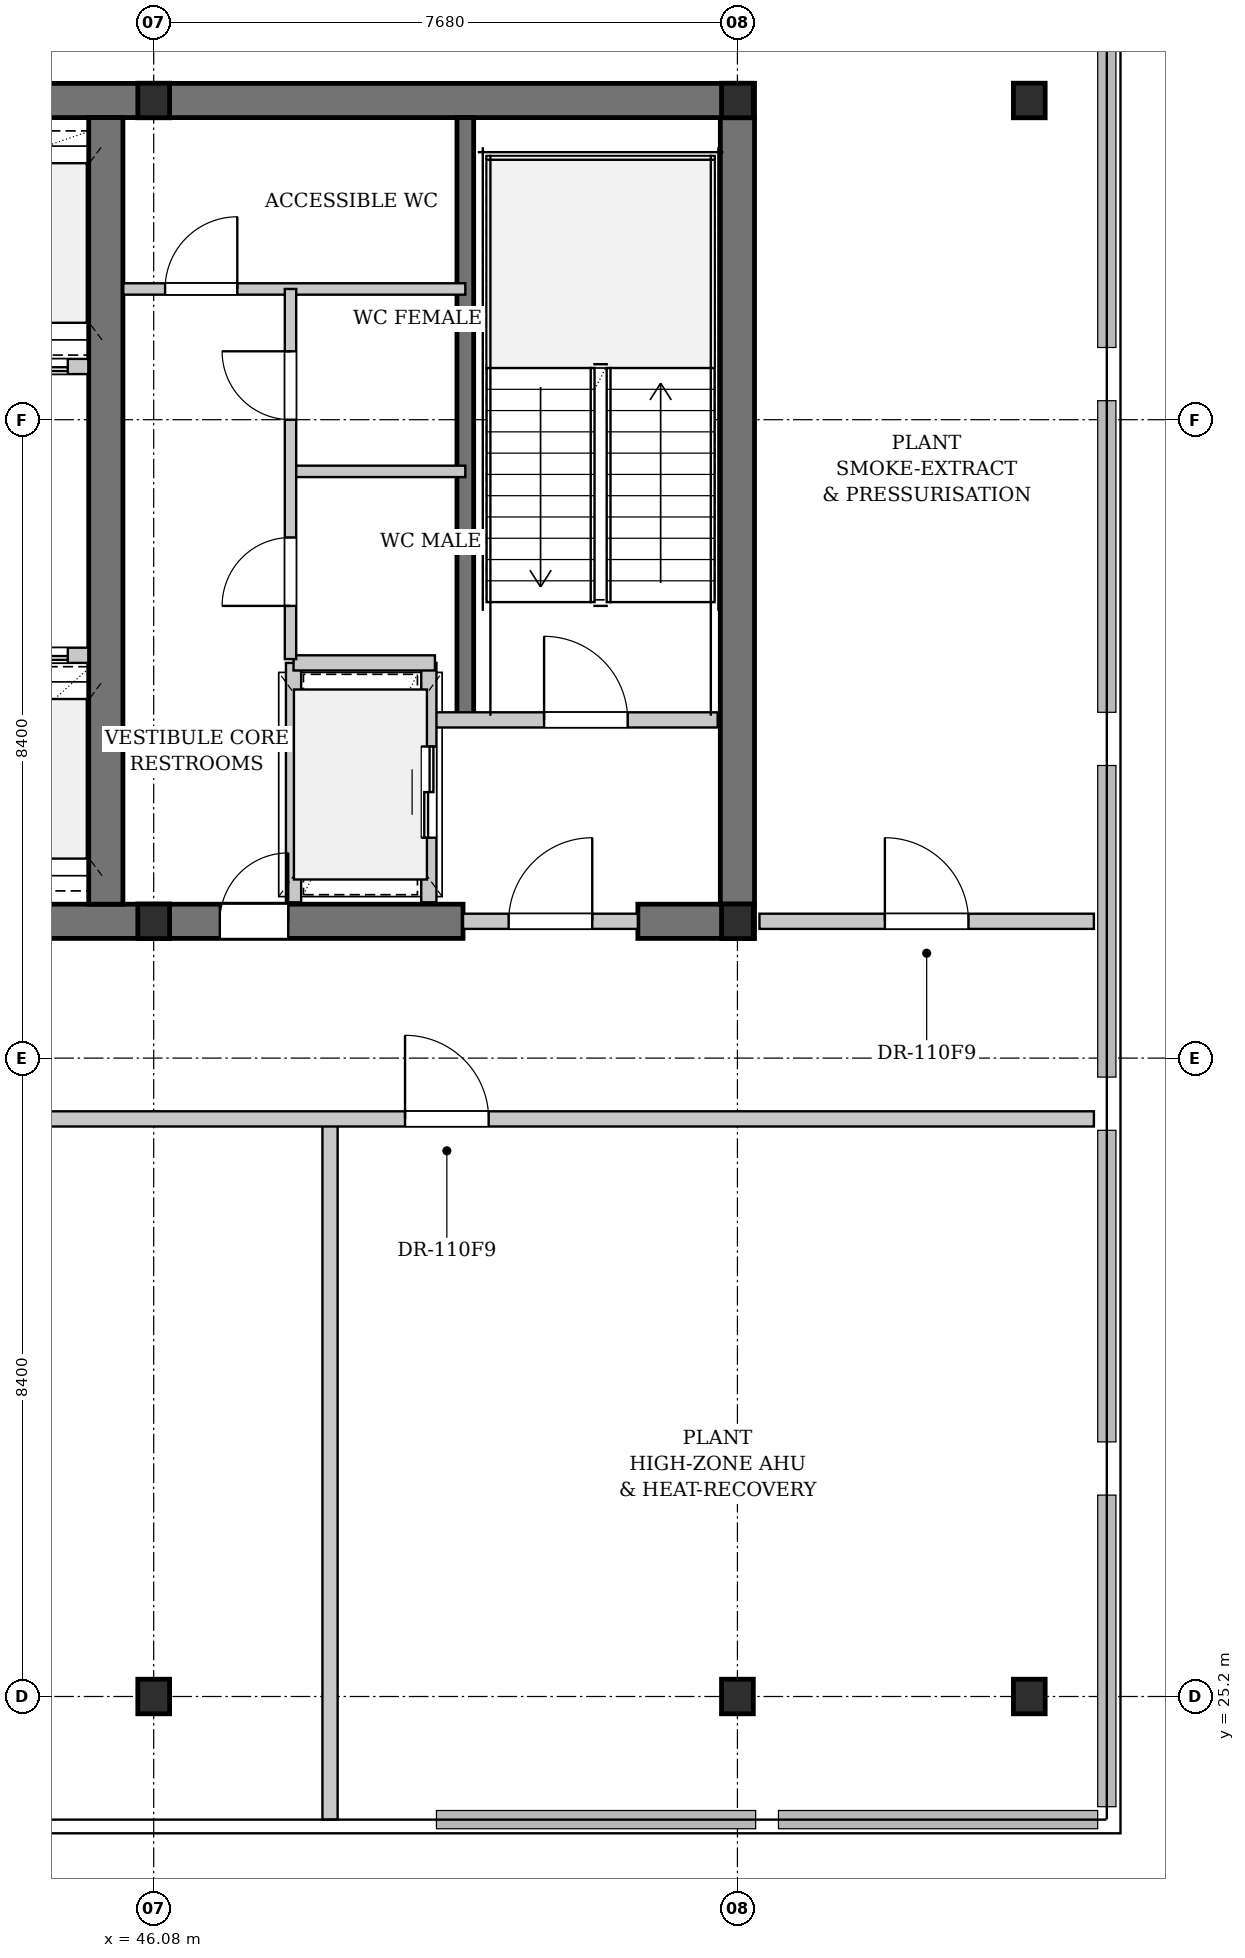
"""IFC4 building model, lengths in metres.
Left out: names, types, materials, properties, quantities, classifications, styles, units other than length and angle.
Written with IfcOpenShell. Run it as: python <this file> out.ifc"""

import sys

from ifc_helpers import new_model, si_unit, direction, frame, frame_2d, origin, origin_2d, place, context, subcontext, project, spatial, rectangle, i_section, extrude, element, fill, save


model = new_model("IFC4")
c1 = context("Model", 3, precision=1e-05, world=origin(), true_north=direction((0.0, 1.0)))
c2 = subcontext(c1, "Body", "Model", "MODEL_VIEW")
j1 = project(units=[si_unit("LENGTHUNIT", "METRE"), si_unit("PLANEANGLEUNIT", "RADIAN")], contexts=[c1])
p1 = place(None, origin())
s1 = spatial("IfcSite", under=j1, at=p1, CompositionType="ELEMENT")
p2 = place(p1, origin())
s2 = spatial("IfcBuilding", under=s1, at=p2, CompositionType="ELEMENT")
p3 = place(p2, frame((0.0, 0.0, 200.3)))
s3 = spatial("IfcBuildingStorey", under=s2, at=p3, CompositionType="ELEMENT", Elevation=200.3)
p4 = place(p3, frame((22.815, 46.2, 0.0), z_axis=(0.0, 0.0, 1.0), x_axis=(1.0, 0.0, 0.0)))
e1 = element("IfcWall", 1, at=p4, inside=s3, PredefinedType="SHEAR", context=c2, shape_type="SweptSolid", body=[
    extrude(rectangle(XDim=31.17, YDim=0.45, at=frame_2d((15.585, 0.0))), origin(), (0.0, 0.0, 1.0), 3.78),
])
p5 = place(p3, frame((42.1, 35.4, 0.0), z_axis=(0.0, 0.0, 1.0), x_axis=(1.0, 0.0, 0.0)))
e2 = element("IfcWall", 2, at=p5, inside=s3, PredefinedType="SHEAR", context=c2, shape_type="SweptSolid", body=[
    extrude(rectangle(XDim=8.05, YDim=0.45, at=frame_2d((4.025, 0.0))), origin(), (0.0, 0.0, 1.0), 3.78),
])
p6 = place(p5, frame((4.85, 0.0, 0.0)))
e3 = element("IfcOpeningElement", 3, at=p6, cuts=e2, PredefinedType="OPENING", context=c2, shape_type="SweptSolid", body=[
    extrude(rectangle(XDim=0.9, YDim=2.15, at=frame_2d((0.45, 1.075))), frame((0.0, 0.235, 0.0), z_axis=(0.0, -1.0, 0.0), x_axis=(1.0, 0.0, 0.0)), (0.0, 0.0, 1.0), 0.47),
])
p7 = place(p3, frame((52.45, 35.4, 0.0), z_axis=(0.0, 0.0, 1.0), x_axis=(1.0, 0.0, 0.0)))
e4 = element("IfcWall", 4, at=p7, inside=s3, PredefinedType="SHEAR", context=c2, shape_type="SweptSolid", body=[
    extrude(rectangle(XDim=1.535, YDim=0.45, at=frame_2d((0.768, 0.0))), origin(), (0.0, 0.0, 1.0), 3.78),
])
for number, where, z_axis, x_axis in (
    (5, (45.45, 35.625, 0.0), (0.0, 0.0, 1.0), (0.0, 1.0, 0.0)),
    (6, (53.76, 35.625, 0.0), (0.0, 0.0, 1.0), (0.0, 1.0, 0.0)),
):
    element("IfcWall", number, at=place(p3, frame(where, z_axis=z_axis, x_axis=x_axis)), inside=s3, PredefinedType="SHEAR", context=c2, shape_type="SweptSolid", body=[
        extrude(rectangle(XDim=10.35, YDim=0.45, at=frame_2d((5.175, 0.0))), origin(), (0.0, 0.0, 1.0), 3.78),
    ])
p8 = place(p3, frame((50.18, 38.05, 0.0), z_axis=(0.0, 0.0, 1.0), x_axis=(0.0, 1.0, 0.0)))
e7 = element("IfcWall", 7, at=p8, inside=s3, PredefinedType="SHEAR", context=c2, shape_type="SweptSolid", body=[
    extrude(rectangle(XDim=7.925, YDim=0.22, at=frame_2d((3.962, 0.0))), origin(), (0.0, 0.0, 1.0), 3.78),
])
for number, where, z_axis, x_axis in (
    (8, (46.08, 35.4, 0.0), (0.0, 0.0, 1.0), (1.0, 0.0, 0.0)),
    (9, (46.08, 46.2, 0.0), (0.0, 0.0, 1.0), (1.0, 0.0, 0.0)),
    (10, (46.08, 25.2, 0.0), (0.0, 0.0, 1.0), (1.0, 0.0, 0.0)),
    (11, (53.76, 35.4, 0.0), (0.0, 0.0, 1.0), (1.0, 0.0, 0.0)),
    (12, (53.76, 46.2, 0.0), (0.0, 0.0, 1.0), (1.0, 0.0, 0.0)),
    (13, (53.76, 25.2, 0.0), (0.0, 0.0, 1.0), (1.0, 0.0, 0.0)),
    (14, (57.6, 25.2, 0.0), (0.0, 0.0, 1.0), (1.0, 0.0, 0.0)),
    (15, (57.6, 46.2, 0.0), (0.0, 0.0, 1.0), (1.0, 0.0, 0.0)),
):
    element("IfcColumn", number, at=place(p3, frame(where, z_axis=z_axis, x_axis=x_axis)), inside=s3, PredefinedType="COLUMN", context=c2, shape_type="SweptSolid", body=[
        extrude(i_section(OverallWidth=0.418, OverallDepth=0.455, WebThickness=0.042, FlangeThickness=0.068, FilletRadius=0.015, at=origin_2d()), origin(), (0.0, 0.0, 1.0), 4.2),
    ])
p9 = place(p3, frame((41.85, 38.9, 0.0), z_axis=(0.0, 0.0, 1.0), x_axis=(1.0, 0.0, 0.0)))
e16 = element("IfcWall", 16, at=p9, inside=s3, PredefinedType="PARTITIONING", context=c2, shape_type="SweptSolid", body=[
    extrude(rectangle(XDim=3.37, YDim=0.2, at=frame_2d((1.685, 0.0))), origin(), (0.0, 0.0, 1.0), 3.78),
])
p10 = place(p9, frame((0.4, 0.0, 0.0)))
e17 = element("IfcOpeningElement", 17, at=p10, cuts=e16, PredefinedType="OPENING", context=c2, shape_type="SweptSolid", body=[
    extrude(rectangle(XDim=1.0, YDim=2.2, at=frame_2d((0.5, 1.1))), frame((0.0, 0.11, 0.0), z_axis=(0.0, -1.0, 0.0), x_axis=(1.0, 0.0, 0.0)), (0.0, 0.0, 1.0), 0.22),
])
p11 = place(p9, frame((2.1, 0.0, 0.0)))
e18 = element("IfcOpeningElement", 18, at=p11, cuts=e16, PredefinedType="OPENING", context=c2, shape_type="SweptSolid", body=[
    extrude(rectangle(XDim=1.0, YDim=2.2, at=frame_2d((0.5, 1.1))), frame((0.0, 0.11, 0.0), z_axis=(0.0, -1.0, 0.0), x_axis=(1.0, 0.0, 0.0)), (0.0, 0.0, 1.0), 0.22),
])
p12 = place(p3, frame((41.85, 42.7, 0.0), z_axis=(0.0, 0.0, 1.0), x_axis=(1.0, 0.0, 0.0)))
e19 = element("IfcWall", 19, at=p12, inside=s3, PredefinedType="PARTITIONING", context=c2, shape_type="SweptSolid", body=[
    extrude(rectangle(XDim=3.37, YDim=0.2, at=frame_2d((1.685, 0.0))), origin(), (0.0, 0.0, 1.0), 3.78),
])
p13 = place(p12, frame((0.4, 0.0, 0.0)))
e20 = element("IfcOpeningElement", 20, at=p13, cuts=e19, PredefinedType="OPENING", context=c2, shape_type="SweptSolid", body=[
    extrude(rectangle(XDim=1.0, YDim=2.2, at=frame_2d((0.5, 1.1))), frame((0.0, 0.11, 0.0), z_axis=(0.0, -1.0, 0.0), x_axis=(1.0, 0.0, 0.0)), (0.0, 0.0, 1.0), 0.22),
])
p14 = place(p12, frame((2.1, 0.0, 0.0)))
e21 = element("IfcOpeningElement", 21, at=p14, cuts=e19, PredefinedType="OPENING", context=c2, shape_type="SweptSolid", body=[
    extrude(rectangle(XDim=1.0, YDim=2.2, at=frame_2d((0.5, 1.1))), frame((0.0, 0.11, 0.0), z_axis=(0.0, -1.0, 0.0), x_axis=(1.0, 0.0, 0.0)), (0.0, 0.0, 1.0), 0.22),
])
p15 = place(p3, frame((49.78, 38.05, 0.0), z_axis=(0.0, 0.0, 1.0), x_axis=(1.0, 0.0, 0.0)))
e22 = element("IfcWall", 22, at=p15, inside=s3, PredefinedType="PARTITIONING", context=c2, shape_type="SweptSolid", body=[
    extrude(rectangle(XDim=3.72, YDim=0.2, at=frame_2d((1.86, 0.0))), origin(), (0.0, 0.0, 1.0), 3.78),
])
p16 = place(p15, frame((1.436, 0.0, 0.0)))
e23 = element("IfcOpeningElement", 23, at=p16, cuts=e22, PredefinedType="OPENING", context=c2, shape_type="SweptSolid", body=[
    extrude(rectangle(XDim=1.1, YDim=2.15, at=frame_2d((0.55, 1.075))), frame((0.0, 0.11, 0.0), z_axis=(0.0, -1.0, 0.0), x_axis=(1.0, 0.0, 0.0)), (0.0, 0.0, 1.0), 0.22),
])
p17 = place(p3, frame((50.15, 35.4, 0.0), z_axis=(0.0, 0.0, 1.0), x_axis=(1.0, 0.0, 0.0)))
e24 = element("IfcWall", 24, at=p17, inside=s3, PredefinedType="PARTITIONING", context=c2, shape_type="SweptSolid", body=[
    extrude(rectangle(XDim=2.3, YDim=0.2, at=frame_2d((1.15, 0.0))), origin(), (0.0, 0.0, 1.0), 2.961),
])
p18 = place(p17, frame((0.6, 0.0, 0.0)))
e25 = element("IfcOpeningElement", 25, at=p18, cuts=e24, PredefinedType="OPENING", context=c2, shape_type="SweptSolid", body=[
    extrude(rectangle(XDim=1.1, YDim=2.15, at=frame_2d((0.55, 1.075))), frame((0.0, 0.11, 0.0), z_axis=(0.0, -1.0, 0.0), x_axis=(1.0, 0.0, 0.0)), (0.0, 0.0, 1.0), 0.22),
])
p19 = place(p3, frame((49.7, 35.65, 0.0), z_axis=(0.0, 0.0, 1.0), x_axis=(0.0, 1.0, 0.0)))
e26 = element("IfcWall", 26, at=p19, inside=s3, PredefinedType="PARTITIONING", context=c2, shape_type="SweptSolid", body=[
    extrude(rectangle(XDim=3.15, YDim=0.2, at=frame_2d((1.575, 0.0))), origin(), (0.0, 0.0, 1.0), 3.78),
])
p20 = place(p19, frame((0.85, 0.0, 0.0)))
e27 = element("IfcOpeningElement", 27, at=p20, cuts=e26, PredefinedType="OPENING", context=c2, shape_type="SweptSolid", body=[
    extrude(rectangle(XDim=1.2, YDim=2.2, at=frame_2d((0.6, 1.1))), frame((0.0, 0.11, 0.0), z_axis=(0.0, -1.0, 0.0), x_axis=(1.0, 0.0, 0.0)), (0.0, 0.0, 1.0), 0.22),
])
p21 = place(p3, frame((47.92, 35.65, 0.0), z_axis=(0.0, 0.0, 1.0), x_axis=(0.0, 1.0, 0.0)))
e28 = element("IfcWall", 28, at=p21, inside=s3, PredefinedType="PARTITIONING", context=c2, shape_type="SweptSolid", body=[
    extrude(rectangle(XDim=3.15, YDim=0.2, at=frame_2d((1.575, 0.0))), origin(), (0.0, 0.0, 1.0), 3.78),
])
p22 = place(p3, frame((47.92, 38.8, 0.0), z_axis=(0.0, 0.0, 1.0), x_axis=(1.0, 0.0, 0.0)))
e29 = element("IfcWall", 29, at=p22, inside=s3, PredefinedType="PARTITIONING", context=c2, shape_type="SweptSolid", body=[
    extrude(rectangle(XDim=1.86, YDim=0.2, at=frame_2d((0.93, 0.0))), origin(), (0.0, 0.0, 1.0), 3.78),
])
p23 = place(p3, frame((45.68, 43.72, 0.0), z_axis=(0.0, 0.0, 1.0), x_axis=(1.0, 0.0, 0.0)))
e30 = element("IfcWall", 30, at=p23, inside=s3, PredefinedType="PARTITIONING", context=c2, shape_type="SweptSolid", body=[
    extrude(rectangle(XDim=4.5, YDim=0.15, at=frame_2d((2.25, 0.0))), origin(), (0.0, 0.0, 1.0), 3.78),
])
p24 = place(p23, frame((0.55, 0.0, 0.0)))
e31 = element("IfcOpeningElement", 31, at=p24, cuts=e30, PredefinedType="OPENING", context=c2, shape_type="SweptSolid", body=[
    extrude(rectangle(XDim=0.95, YDim=2.15, at=frame_2d((0.475, 1.075))), frame((0.0, 0.085, 0.0), z_axis=(0.0, -1.0, 0.0), x_axis=(1.0, 0.0, 0.0)), (0.0, 0.0, 1.0), 0.17),
])
p25 = place(p3, frame((47.88, 41.32, 0.0), z_axis=(0.0, 0.0, 1.0), x_axis=(1.0, 0.0, 0.0)))
e32 = element("IfcWall", 32, at=p25, inside=s3, PredefinedType="PARTITIONING", context=c2, shape_type="SweptSolid", body=[
    extrude(rectangle(XDim=2.3, YDim=0.15, at=frame_2d((1.15, 0.0))), origin(), (0.0, 0.0, 1.0), 3.78),
])
p26 = place(p3, frame((47.88, 38.85, 0.0), z_axis=(0.0, 0.0, 1.0), x_axis=(0.0, 1.0, 0.0)))
e33 = element("IfcWall", 33, at=p26, inside=s3, PredefinedType="PARTITIONING", context=c2, shape_type="SweptSolid", body=[
    extrude(rectangle(XDim=4.87, YDim=0.15, at=frame_2d((2.435, 0.0))), origin(), (0.0, 0.0, 1.0), 3.78),
])
p27 = place(p26, frame((0.7, 0.0, 0.0)))
e34 = element("IfcOpeningElement", 34, at=p27, cuts=e33, PredefinedType="OPENING", context=c2, shape_type="SweptSolid", body=[
    extrude(rectangle(XDim=0.9, YDim=2.15, at=frame_2d((0.45, 1.075))), frame((0.0, 0.085, 0.0), z_axis=(0.0, -1.0, 0.0), x_axis=(1.0, 0.0, 0.0)), (0.0, 0.0, 1.0), 0.17),
])
p28 = place(p26, frame((3.15, 0.0, 0.0)))
e35 = element("IfcOpeningElement", 35, at=p28, cuts=e33, PredefinedType="OPENING", context=c2, shape_type="SweptSolid", body=[
    extrude(rectangle(XDim=0.9, YDim=2.15, at=frame_2d((0.45, 1.075))), frame((0.0, 0.085, 0.0), z_axis=(0.0, -1.0, 0.0), x_axis=(1.0, 0.0, 0.0)), (0.0, 0.0, 1.0), 0.17),
])
p29 = place(p3, frame((54.05, 35.4, 0.0), z_axis=(0.0, 0.0, 1.0), x_axis=(1.0, 0.0, 0.0)))
e36 = element("IfcWall", 36, at=p29, inside=s3, PredefinedType="PARTITIONING", context=c2, shape_type="SweptSolid", body=[
    extrude(rectangle(XDim=4.4, YDim=0.2, at=frame_2d((2.2, 0.0))), origin(), (0.0, 0.0, 1.0), 3.78),
])
p30 = place(p29, frame((1.65, 0.0, 0.0)))
e37 = element("IfcOpeningElement", 37, at=p30, cuts=e36, PredefinedType="OPENING", context=c2, shape_type="SweptSolid", body=[
    extrude(rectangle(XDim=1.1, YDim=2.15, at=frame_2d((0.55, 1.075))), frame((0.0, 0.11, 0.0), z_axis=(0.0, -1.0, 0.0), x_axis=(1.0, 0.0, 0.0)), (0.0, 0.0, 1.0), 0.22),
])
p31 = place(p3, frame((48.4, 23.58, 0.0), z_axis=(0.0, 0.0, 1.0), x_axis=(0.0, 1.0, 0.0)))
e38 = element("IfcWall", 38, at=p31, inside=s3, PredefinedType="PARTITIONING", context=c2, shape_type="SweptSolid", body=[
    extrude(rectangle(XDim=9.22, YDim=0.2, at=frame_2d((4.61, 0.0))), origin(), (0.0, 0.0, 1.0), 3.78),
])
p32 = place(p3, frame((18.35, 32.8, 0.0), z_axis=(0.0, 0.0, 1.0), x_axis=(1.0, 0.0, 0.0)))
e39 = element("IfcWall", 39, at=p32, inside=s3, PredefinedType="PARTITIONING", context=c2, shape_type="SweptSolid", body=[
    extrude(rectangle(XDim=40.1, YDim=0.2, at=frame_2d((20.05, 0.0))), origin(), (0.0, 0.0, 1.0), 2.575),
])
p33 = place(p32, frame((7.962, 0.0, 0.0)))
e40 = element("IfcOpeningElement", 40, at=p33, cuts=e39, PredefinedType="OPENING", context=c2, shape_type="SweptSolid", body=[
    extrude(rectangle(XDim=1.1, YDim=2.15, at=frame_2d((0.55, 1.075))), frame((0.0, 0.11, 0.0), z_axis=(0.0, -1.0, 0.0), x_axis=(1.0, 0.0, 0.0)), (0.0, 0.0, 1.0), 0.22),
])
p34 = place(p32, frame((31.037, 0.0, 0.0)))
e41 = element("IfcOpeningElement", 41, at=p34, cuts=e39, PredefinedType="OPENING", context=c2, shape_type="SweptSolid", body=[
    extrude(rectangle(XDim=1.1, YDim=2.15, at=frame_2d((0.55, 1.075))), frame((0.0, 0.11, 0.0), z_axis=(0.0, -1.0, 0.0), x_axis=(1.0, 0.0, 0.0)), (0.0, 0.0, 1.0), 0.22),
])
p35 = place(p11, origin())
e42 = element("IfcDoor", 42, at=p35, inside=s3, OperationType="DOUBLE_DOOR_SLIDING", PredefinedType="DOOR", context=c2, shape_type="SweptSolid", body=[
    extrude(rectangle(XDim=1.0, YDim=2.2, at=frame_2d((0.5, 1.1))), frame((0.0, 0.025, 0.0), z_axis=(0.0, -1.0, 0.0), x_axis=(1.0, 0.0, 0.0)), (0.0, 0.0, 1.0), 0.05),
])
fill(e18, e42)
p36 = place(p14, origin())
e43 = element("IfcDoor", 43, at=p36, inside=s3, OperationType="DOUBLE_DOOR_SLIDING", PredefinedType="DOOR", context=c2, shape_type="SweptSolid", body=[
    extrude(rectangle(XDim=1.0, YDim=2.2, at=frame_2d((0.5, 1.1))), frame((0.0, 0.025, 0.0), z_axis=(0.0, -1.0, 0.0), x_axis=(1.0, 0.0, 0.0)), (0.0, 0.0, 1.0), 0.05),
])
fill(e21, e43)
p37 = place(p16, origin())
e44 = element("IfcDoor", 44, at=p37, inside=s3, OperationType="SINGLE_SWING_LEFT", PredefinedType="DOOR", context=c2, shape_type="SweptSolid", body=[
    extrude(rectangle(XDim=1.1, YDim=2.15, at=frame_2d((0.55, 1.075))), frame((0.0, 0.025, 0.0), z_axis=(0.0, -1.0, 0.0), x_axis=(1.0, 0.0, 0.0)), (0.0, 0.0, 1.0), 0.05),
])
fill(e23, e44)
p38 = place(p18, origin())
e45 = element("IfcDoor", 45, at=p38, inside=s3, OperationType="SINGLE_SWING_RIGHT", PredefinedType="DOOR", context=c2, shape_type="SweptSolid", body=[
    extrude(rectangle(XDim=1.1, YDim=2.15, at=frame_2d((0.55, 1.075))), frame((0.0, 0.025, 0.0), z_axis=(0.0, -1.0, 0.0), x_axis=(1.0, 0.0, 0.0)), (0.0, 0.0, 1.0), 0.05),
])
fill(e25, e45)
p39 = place(p20, origin())
e46 = element("IfcDoor", 46, at=p39, inside=s3, OperationType="DOUBLE_DOOR_SLIDING", PredefinedType="DOOR", context=c2, shape_type="SweptSolid", body=[
    extrude(rectangle(XDim=1.2, YDim=2.2, at=frame_2d((0.6, 1.1))), frame((0.0, 0.025, 0.0), z_axis=(0.0, -1.0, 0.0), x_axis=(1.0, 0.0, 0.0)), (0.0, 0.0, 1.0), 0.05),
])
fill(e27, e46)
p40 = place(p24, origin())
e47 = element("IfcDoor", 47, at=p40, inside=s3, OperationType="SINGLE_SWING_RIGHT", PredefinedType="DOOR", context=c2, shape_type="SweptSolid", body=[
    extrude(rectangle(XDim=0.95, YDim=2.15, at=frame_2d((0.475, 1.075))), frame((0.0, 0.025, 0.0), z_axis=(0.0, -1.0, 0.0), x_axis=(1.0, 0.0, 0.0)), (0.0, 0.0, 1.0), 0.05),
])
fill(e31, e47)
p41 = place(p27, origin())
e48 = element("IfcDoor", 48, at=p41, inside=s3, OperationType="SINGLE_SWING_LEFT", PredefinedType="DOOR", context=c2, shape_type="SweptSolid", body=[
    extrude(rectangle(XDim=0.9, YDim=2.15, at=frame_2d((0.45, 1.075))), frame((0.0, 0.025, 0.0), z_axis=(0.0, -1.0, 0.0), x_axis=(1.0, 0.0, 0.0)), (0.0, 0.0, 1.0), 0.05),
])
fill(e34, e48)
p42 = place(p28, origin())
e49 = element("IfcDoor", 49, at=p42, inside=s3, OperationType="SINGLE_SWING_RIGHT", PredefinedType="DOOR", context=c2, shape_type="SweptSolid", body=[
    extrude(rectangle(XDim=0.9, YDim=2.15, at=frame_2d((0.45, 1.075))), frame((0.0, 0.025, 0.0), z_axis=(0.0, -1.0, 0.0), x_axis=(1.0, 0.0, 0.0)), (0.0, 0.0, 1.0), 0.05),
])
fill(e35, e49)
p43 = place(p30, origin())
e50 = element("IfcDoor", 50, at=p43, inside=s3, OperationType="SINGLE_SWING_LEFT", PredefinedType="DOOR", context=c2, shape_type="SweptSolid", body=[
    extrude(rectangle(XDim=1.1, YDim=2.15, at=frame_2d((0.55, 1.075))), frame((0.0, 0.025, 0.0), z_axis=(0.0, -1.0, 0.0), x_axis=(1.0, 0.0, 0.0)), (0.0, 0.0, 1.0), 0.05),
])
fill(e37, e50)
p44 = place(p34, origin())
e51 = element("IfcDoor", 51, at=p44, inside=s3, OperationType="SINGLE_SWING_LEFT", PredefinedType="DOOR", context=c2, shape_type="SweptSolid", body=[
    extrude(rectangle(XDim=1.1, YDim=2.15, at=frame_2d((0.55, 1.075))), frame((0.0, 0.025, 0.0), z_axis=(0.0, -1.0, 0.0), x_axis=(1.0, 0.0, 0.0)), (0.0, 0.0, 1.0), 0.05),
])
fill(e41, e51)
p45 = place(p6, origin())
e52 = element("IfcDoor", 52, at=p45, inside=s3, OperationType="SINGLE_SWING_RIGHT", PredefinedType="DOOR", context=c2, shape_type="SweptSolid", body=[
    extrude(rectangle(XDim=0.9, YDim=2.15, at=frame_2d((0.45, 1.075))), frame((0.0, 0.025, 0.0), z_axis=(0.0, -1.0, 0.0), x_axis=(1.0, 0.0, 0.0)), (0.0, 0.0, 1.0), 0.05),
])
fill(e3, e52)
save(model, sys.argv[1])
